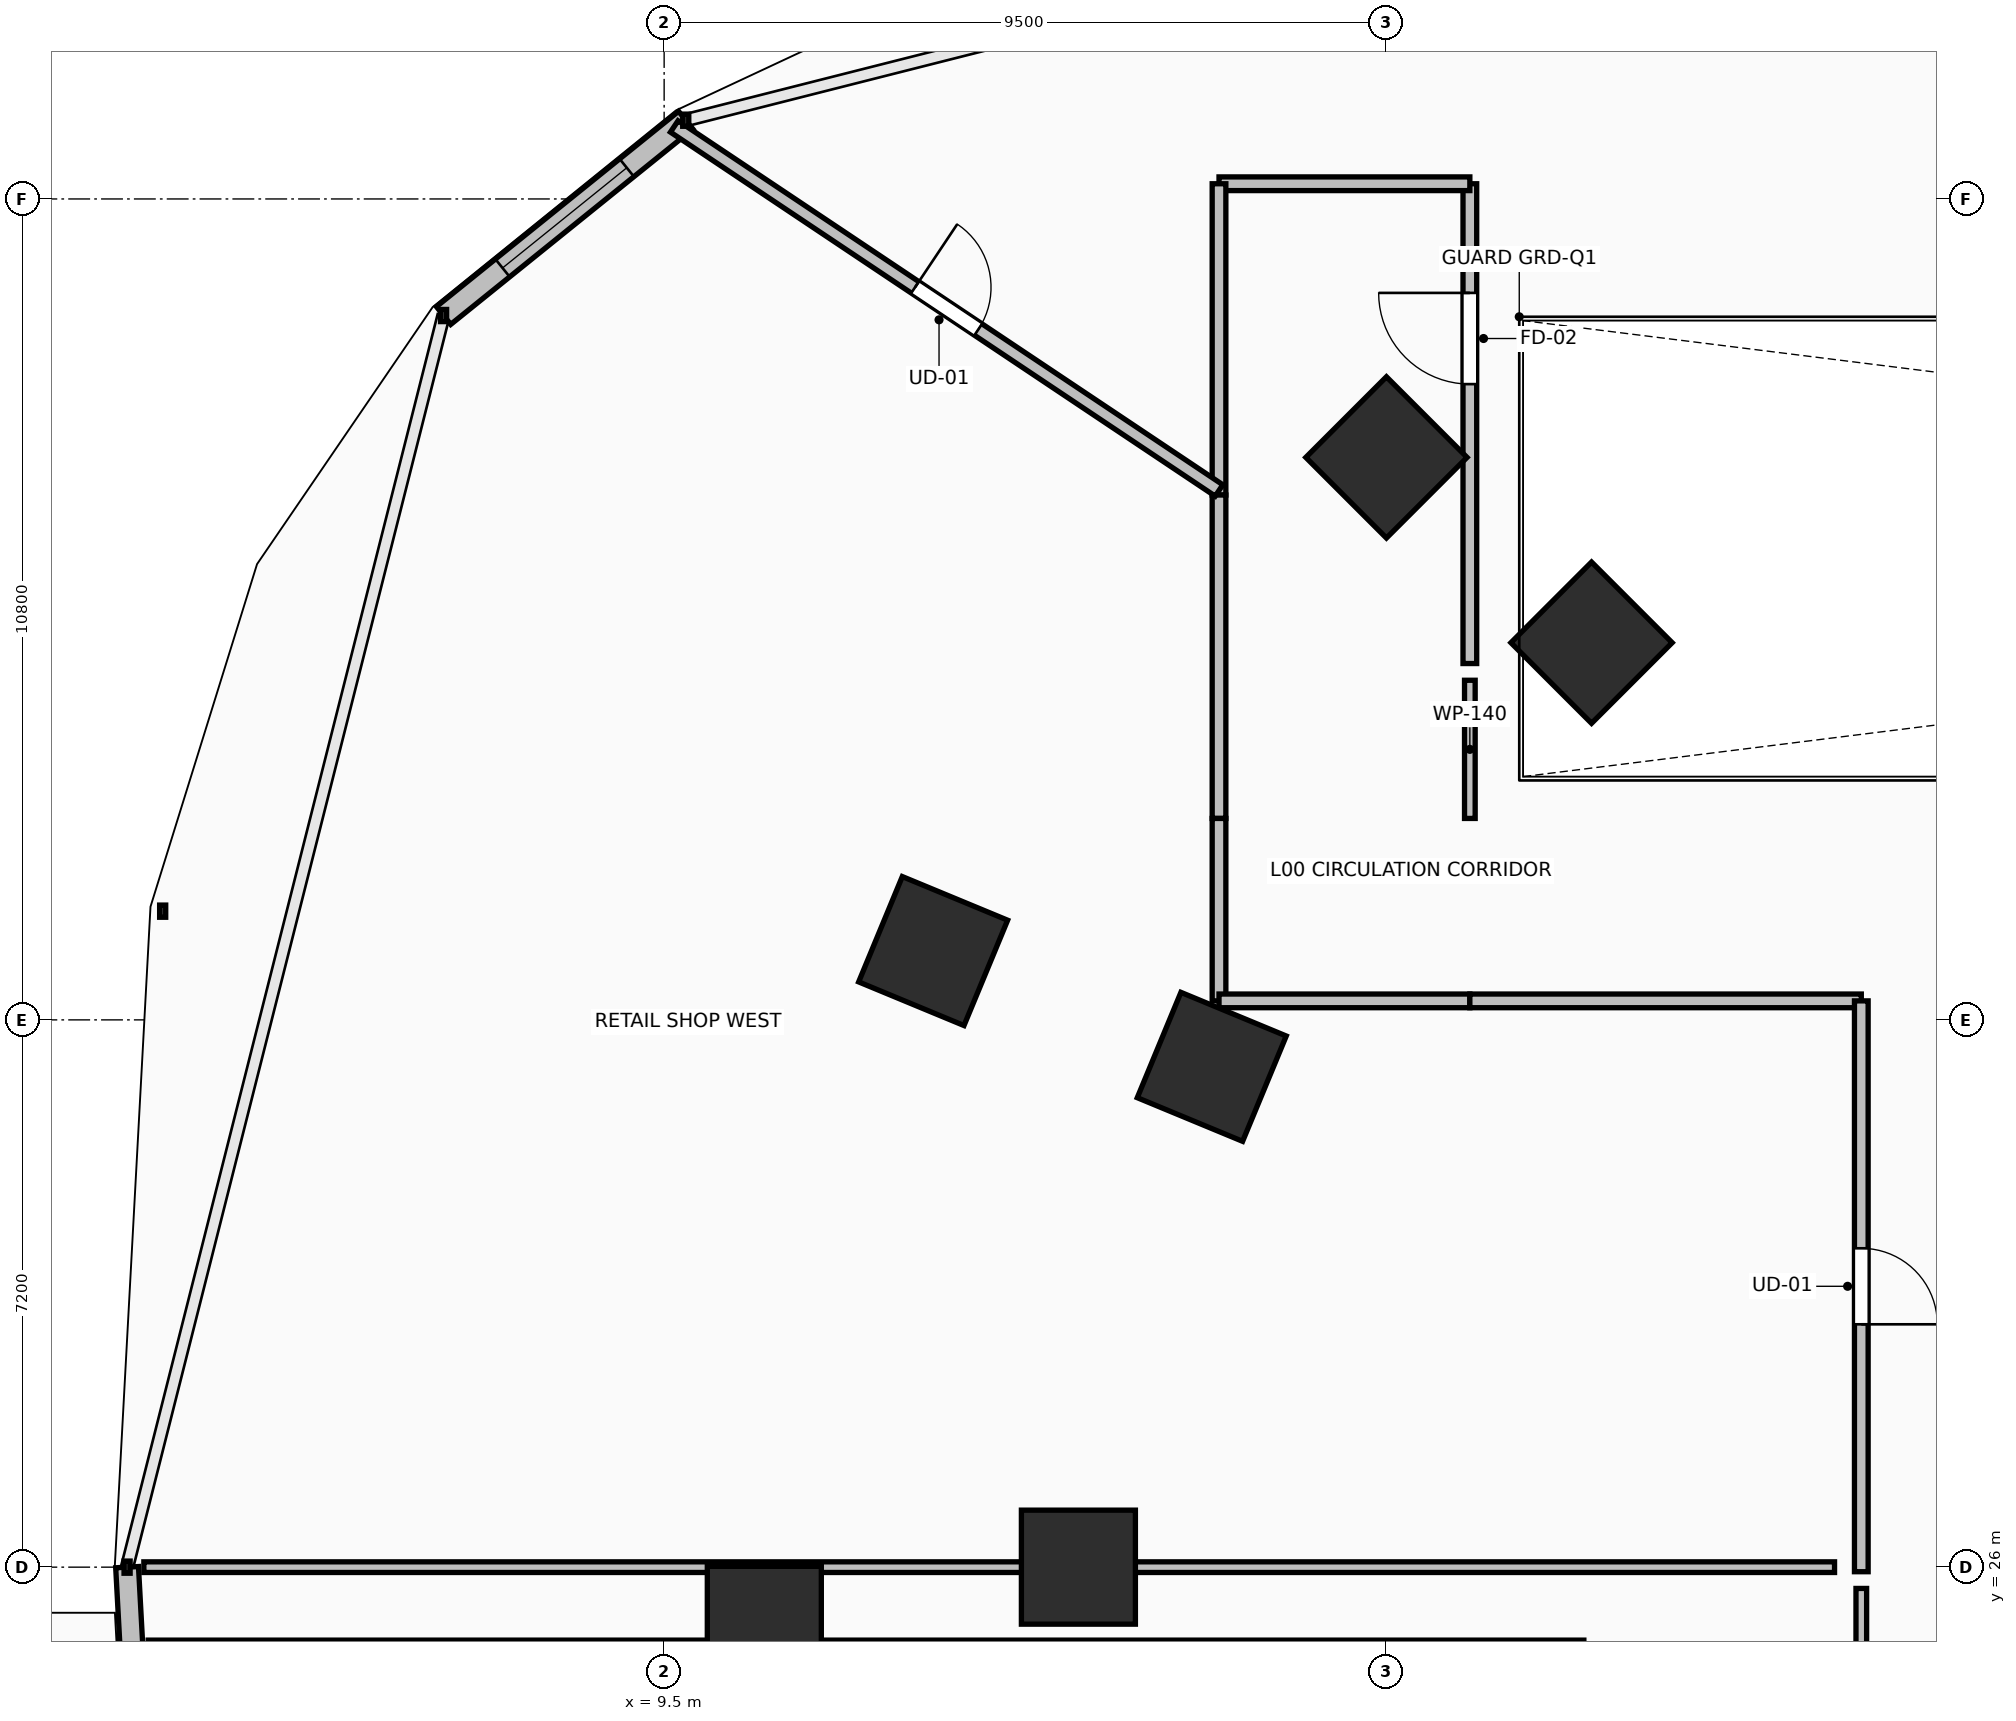
"""IFC4 building model, lengths in metres.
Left out: names, types, materials, properties, quantities, classifications, styles, units other than length and angle.
Written with IfcOpenShell. Run it as: python <this file> out.ifc"""

import sys

from ifc_helpers import new_model, si_unit, direction, frame, frame_2d, origin, origin_2d, place, context, subcontext, project, spatial, rectangle, extrude, element, fill, save


model = new_model("IFC4")
c1 = context("Model", 3, precision=1e-05, world=origin(), true_north=direction((0.0, 1.0)))
c2 = subcontext(c1, "Body", "Model", "MODEL_VIEW")
j1 = project(units=[si_unit("LENGTHUNIT", "METRE"), si_unit("PLANEANGLEUNIT", "RADIAN")], contexts=[c1])
p1 = place(None, origin())
s1 = spatial("IfcSite", under=j1, at=p1, CompositionType="ELEMENT")
p2 = place(p1, origin())
s2 = spatial("IfcBuilding", under=s1, at=p2, CompositionType="ELEMENT")
p3 = place(p2, origin())
s3 = spatial("IfcBuildingStorey", under=s2, at=p3, CompositionType="ELEMENT", Elevation=0.0)
for number, where, z_axis, x_axis in (
    (1, (21.701, 38.162, 0.0), (0.0, 0.0, 1.0), (-0.707, 0.707, 0.0)),
    (2, (16.705, 32.582, 0.0), (0.0, 0.0, 1.0), (-0.924, 0.383, 0.0)),
    (3, (14.95, 26.0, 0.0), (0.0, 0.0, 1.0), (-1.0, 0.0, 0.0)),
    (4, (19.003, 40.6, 0.0), (0.0, 0.0, 1.0), (-0.707, 0.707, 0.0)),
    (5, (13.039, 34.105, 0.0), (0.0, 0.0, 1.0), (-0.924, 0.383, 0.0)),
    (6, (10.818, 25.261, 0.0), (0.0, 0.0, 1.0), (-1.0, 0.0, 0.0)),
):
    element("IfcColumn", number, at=place(p3, frame(where, z_axis=z_axis, x_axis=x_axis)), inside=s3, PredefinedType="COLUMN", context=c2, shape_type="SweptSolid", body=[
        extrude(rectangle(XDim=1.5, YDim=1.5, at=origin_2d()), origin(), (0.0, 0.0, 1.0), 4.8),
    ])
p4 = place(p3, frame((9.784, 45.036, 0.0), z_axis=(0.0, 0.0, 1.0), x_axis=(-0.778389533764, -0.627781597155, 0.0)))
e7 = element("IfcWall", 7, at=p4, inside=s3, PredefinedType="STANDARD", context=c2, shape_type="SweptSolid", body=[
    extrude(rectangle(XDim=4.093, YDim=0.3, at=frame_2d((2.046, 0.0))), origin(), (0.0, 0.0, 1.0), 4.48),
])
p5 = place(p4, frame((0.997, 0.0, 0.9)))
e8 = element("IfcOpeningElement", 8, at=p5, cuts=e7, PredefinedType="OPENING", context=c2, shape_type="SweptSolid", body=[
    extrude(rectangle(XDim=2.1, YDim=2.4, at=frame_2d((1.05, 1.2))), frame((0.0, 0.165, 0.0), z_axis=(0.0, -1.0, 0.0), x_axis=(1.0, 0.0, 0.0)), (0.0, 0.0, 1.0), 0.33),
])
p6 = place(p3, frame((2.434, 26.0, 0.0), z_axis=(0.0, 0.0, 1.0), x_axis=(0.054179266439, -0.998531224894, 0.0)))
e9 = element("IfcWall", 9, at=p6, inside=s3, PredefinedType="STANDARD", context=c2, shape_type="SweptSolid", body=[
    extrude(rectangle(XDim=8.643, YDim=0.3, at=frame_2d((4.321, 0.0))), origin(), (0.0, 0.0, 1.0), 4.48),
])
p7 = place(p6, frame((2.354, 0.0, 0.0)))
e10 = element("IfcOpeningElement", 10, at=p7, cuts=e9, PredefinedType="OPENING", context=c2, shape_type="SweptSolid", body=[
    extrude(rectangle(XDim=1.2, YDim=2.15, at=frame_2d((0.6, 1.075))), frame((0.0, 0.165, 0.0), z_axis=(0.0, -1.0, 0.0), x_axis=(1.0, 0.0, 0.0)), (0.0, 0.0, 1.0), 0.33),
])
p8 = place(p3, frame((20.1, 37.888, 0.0), z_axis=(0.0, 0.0, 1.0), x_axis=(0.0, 1.0, 0.0)))
e11 = element("IfcWall", 11, at=p8, inside=s3, PredefinedType="PARTITIONING", context=c2, shape_type="SweptSolid", body=[
    extrude(rectangle(XDim=6.312, YDim=0.18, at=frame_2d((3.156, 0.0))), origin(), (0.0, 0.0, 1.0), 3.672),
])
p9 = place(p8, frame((3.676, 0.0, 0.0)))
e12 = element("IfcOpeningElement", 12, at=p9, cuts=e11, PredefinedType="OPENING", context=c2, shape_type="SweptSolid", body=[
    extrude(rectangle(XDim=1.2, YDim=2.15, at=frame_2d((0.6, 1.075))), frame((0.0, 0.105, 0.0), z_axis=(0.0, -1.0, 0.0), x_axis=(1.0, 0.0, 0.0)), (0.0, 0.0, 1.0), 0.21),
])
p10 = place(p3, frame((20.1, 44.2, 0.0), z_axis=(0.0, 0.0, 1.0), x_axis=(-1.0, 0.0, 0.0)))
e13 = element("IfcWall", 13, at=p10, inside=s3, PredefinedType="PARTITIONING", context=c2, shape_type="SweptSolid", body=[
    extrude(rectangle(XDim=3.3, YDim=0.18, at=frame_2d((1.65, 0.0))), origin(), (0.0, 0.0, 1.0), 4.48),
])
p11 = place(p3, frame((16.8, 44.2, 0.0), z_axis=(0.0, 0.0, 1.0), x_axis=(0.0, -1.0, 0.0)))
e14 = element("IfcWall", 14, at=p11, inside=s3, PredefinedType="PARTITIONING", context=c2, shape_type="SweptSolid", body=[
    extrude(rectangle(XDim=4.095, YDim=0.18, at=frame_2d((2.047, 0.0))), origin(), (0.0, 0.0, 1.0), 4.48),
])
p12 = place(p3, frame((16.8, 40.105, 0.0), z_axis=(0.0, 0.0, 1.0), x_axis=(0.0, -1.0, 0.0)))
e15 = element("IfcWall", 15, at=p12, inside=s3, PredefinedType="PARTITIONING", context=c2, shape_type="SweptSolid", body=[
    extrude(rectangle(XDim=4.255, YDim=0.18, at=frame_2d((2.127, 0.0))), origin(), (0.0, 0.0, 1.0), 3.769),
])
p13 = place(p3, frame((16.8, 35.85, 0.0), z_axis=(0.0, 0.0, 1.0), x_axis=(0.0, -1.0, 0.0)))
e16 = element("IfcWall", 16, at=p13, inside=s3, PredefinedType="PARTITIONING", context=c2, shape_type="SweptSolid", body=[
    extrude(rectangle(XDim=2.4, YDim=0.18, at=frame_2d((1.2, 0.0))), origin(), (0.0, 0.0, 1.0), 4.48),
])
p14 = place(p3, frame((16.8, 33.45, 0.0), z_axis=(0.0, 0.0, 1.0), x_axis=(1.0, 0.0, 0.0)))
e17 = element("IfcWall", 17, at=p14, inside=s3, PredefinedType="PARTITIONING", context=c2, shape_type="SweptSolid", body=[
    extrude(rectangle(XDim=3.3, YDim=0.18, at=frame_2d((1.65, 0.0))), origin(), (0.0, 0.0, 1.0), 4.162),
])
p15 = place(p3, frame((20.1, 33.45, 0.0), z_axis=(0.0, 0.0, 1.0), x_axis=(1.0, 0.0, 0.0)))
e18 = element("IfcWall", 18, at=p15, inside=s3, PredefinedType="PARTITIONING", context=c2, shape_type="SweptSolid", body=[
    extrude(rectangle(XDim=5.15, YDim=0.18, at=frame_2d((2.575, 0.0))), origin(), (0.0, 0.0, 1.0), 4.212),
])
p16 = place(p3, frame((25.25, 33.45, 0.0), z_axis=(0.0, 0.0, 1.0), x_axis=(0.0, -1.0, 0.0)))
e19 = element("IfcWall", 19, at=p16, inside=s3, PredefinedType="PARTITIONING", context=c2, shape_type="SweptSolid", body=[
    extrude(rectangle(XDim=7.51, YDim=0.18, at=frame_2d((3.755, 0.0))), origin(), (0.0, 0.0, 1.0), 3.672),
])
p17 = place(p16, frame((3.255, 0.0, 0.0)))
e20 = element("IfcOpeningElement", 20, at=p17, cuts=e19, PredefinedType="OPENING", context=c2, shape_type="SweptSolid", body=[
    extrude(rectangle(XDim=1.0, YDim=2.15, at=frame_2d((0.5, 1.075))), frame((0.0, 0.105, 0.0), z_axis=(0.0, -1.0, 0.0), x_axis=(1.0, 0.0, 0.0)), (0.0, 0.0, 1.0), 0.21),
])
p18 = place(p3, frame((9.633, 44.954, 0.0), z_axis=(0.0, 0.0, 1.0), x_axis=(0.83145721005, -0.555588793853, 0.0)))
e21 = element("IfcWall", 21, at=p18, inside=s3, PredefinedType="PARTITIONING", context=c2, shape_type="SweptSolid", body=[
    extrude(rectangle(XDim=8.62, YDim=0.18, at=frame_2d((4.31, 0.0))), origin(), (0.0, 0.0, 1.0), 4.48),
])
p19 = place(p18, frame((3.81, 0.0, 0.0)))
e22 = element("IfcOpeningElement", 22, at=p19, cuts=e21, PredefinedType="OPENING", context=c2, shape_type="SweptSolid", body=[
    extrude(rectangle(XDim=1.0, YDim=2.15, at=frame_2d((0.5, 1.075))), frame((0.0, 0.105, 0.0), z_axis=(0.0, -1.0, 0.0), x_axis=(1.0, 0.0, 0.0)), (0.0, 0.0, 1.0), 0.21),
])
p20 = place(p3, frame((20.1, 35.85, 0.0), z_axis=(0.0, 0.0, 1.0), x_axis=(0.0, 1.0, 0.0)))
e23 = element("IfcWall", 23, at=p20, inside=s3, PredefinedType="PARTITIONING", context=c2, shape_type="SweptSolid", body=[
    extrude(rectangle(XDim=1.818, YDim=0.14, at=frame_2d((0.909, 0.0))), origin(), (0.0, 0.0, 1.0), 4.162),
])
p21 = place(p3, frame((25.25, 25.72, 0.0), z_axis=(0.0, 0.0, 1.0), x_axis=(0.0, -1.0, 0.0)))
e24 = element("IfcWall", 24, at=p21, inside=s3, PredefinedType="PARTITIONING", context=c2, shape_type="SweptSolid", body=[
    extrude(rectangle(XDim=2.84, YDim=0.14, at=frame_2d((1.42, 0.0))), origin(), (0.0, 0.0, 1.0), 4.48),
])
p22 = place(p3, frame((21.6, 24.95, 0.0), z_axis=(0.0, 0.0, 1.0), x_axis=(-1.0, 0.0, 0.0)))
e25 = element("IfcWall", 25, at=p22, inside=s3, PredefinedType="PARTITIONING", context=c2, shape_type="SweptSolid", body=[
    extrude(rectangle(XDim=18.888, YDim=0.18, at=frame_2d((9.444, 0.0))), origin(), (0.0, 0.0, 1.0), 4.162),
])
p23 = place(p3, frame((2.655, 26.0, 0.0), z_axis=(0.0, 0.0, 1.0), x_axis=(1.0, 0.0, 0.0)))
e26 = element("IfcWall", 26, at=p23, inside=s3, PredefinedType="PARTITIONING", context=c2, shape_type="SweptSolid", body=[
    extrude(rectangle(XDim=22.243, YDim=0.14, at=frame_2d((11.122, 0.0))), origin(), (0.0, 0.0, 1.0), 3.672),
])
p24 = place(p5, origin())
e27 = element("IfcWindow", 27, at=p24, inside=s3, PartitioningType="SINGLE_PANEL", PredefinedType="WINDOW", context=c2, shape_type="SweptSolid", body=[
    extrude(rectangle(XDim=2.1, YDim=2.4, at=frame_2d((1.05, 1.2))), frame((0.0, 0.03, 0.0), z_axis=(0.0, -1.0, 0.0), x_axis=(1.0, 0.0, 0.0)), (0.0, 0.0, 1.0), 0.06),
])
fill(e8, e27)
p25 = place(p9, origin())
e28 = element("IfcDoor", 28, at=p25, inside=s3, OperationType="SINGLE_SWING_RIGHT", PredefinedType="DOOR", context=c2, shape_type="SweptSolid", body=[
    extrude(rectangle(XDim=1.2, YDim=2.15, at=frame_2d((0.6, 1.075))), frame((0.0, 0.025, 0.0), z_axis=(0.0, -1.0, 0.0), x_axis=(1.0, 0.0, 0.0)), (0.0, 0.0, 1.0), 0.05),
])
fill(e12, e28)
p26 = place(p17, origin())
e29 = element("IfcDoor", 29, at=p26, inside=s3, OperationType="SINGLE_SWING_RIGHT", PredefinedType="DOOR", context=c2, shape_type="SweptSolid", body=[
    extrude(rectangle(XDim=1.0, YDim=2.15, at=frame_2d((0.5, 1.075))), frame((0.0, 0.025, 0.0), z_axis=(0.0, -1.0, 0.0), x_axis=(1.0, 0.0, 0.0)), (0.0, 0.0, 1.0), 0.05),
])
fill(e20, e29)
p27 = place(p19, origin())
e30 = element("IfcDoor", 30, at=p27, inside=s3, OperationType="SINGLE_SWING_LEFT", PredefinedType="DOOR", context=c2, shape_type="SweptSolid", body=[
    extrude(rectangle(XDim=1.0, YDim=2.15, at=frame_2d((0.5, 1.075))), frame((0.0, 0.025, 0.0), z_axis=(0.0, -1.0, 0.0), x_axis=(1.0, 0.0, 0.0)), (0.0, 0.0, 1.0), 0.05),
])
fill(e22, e30)
save(model, sys.argv[1])
